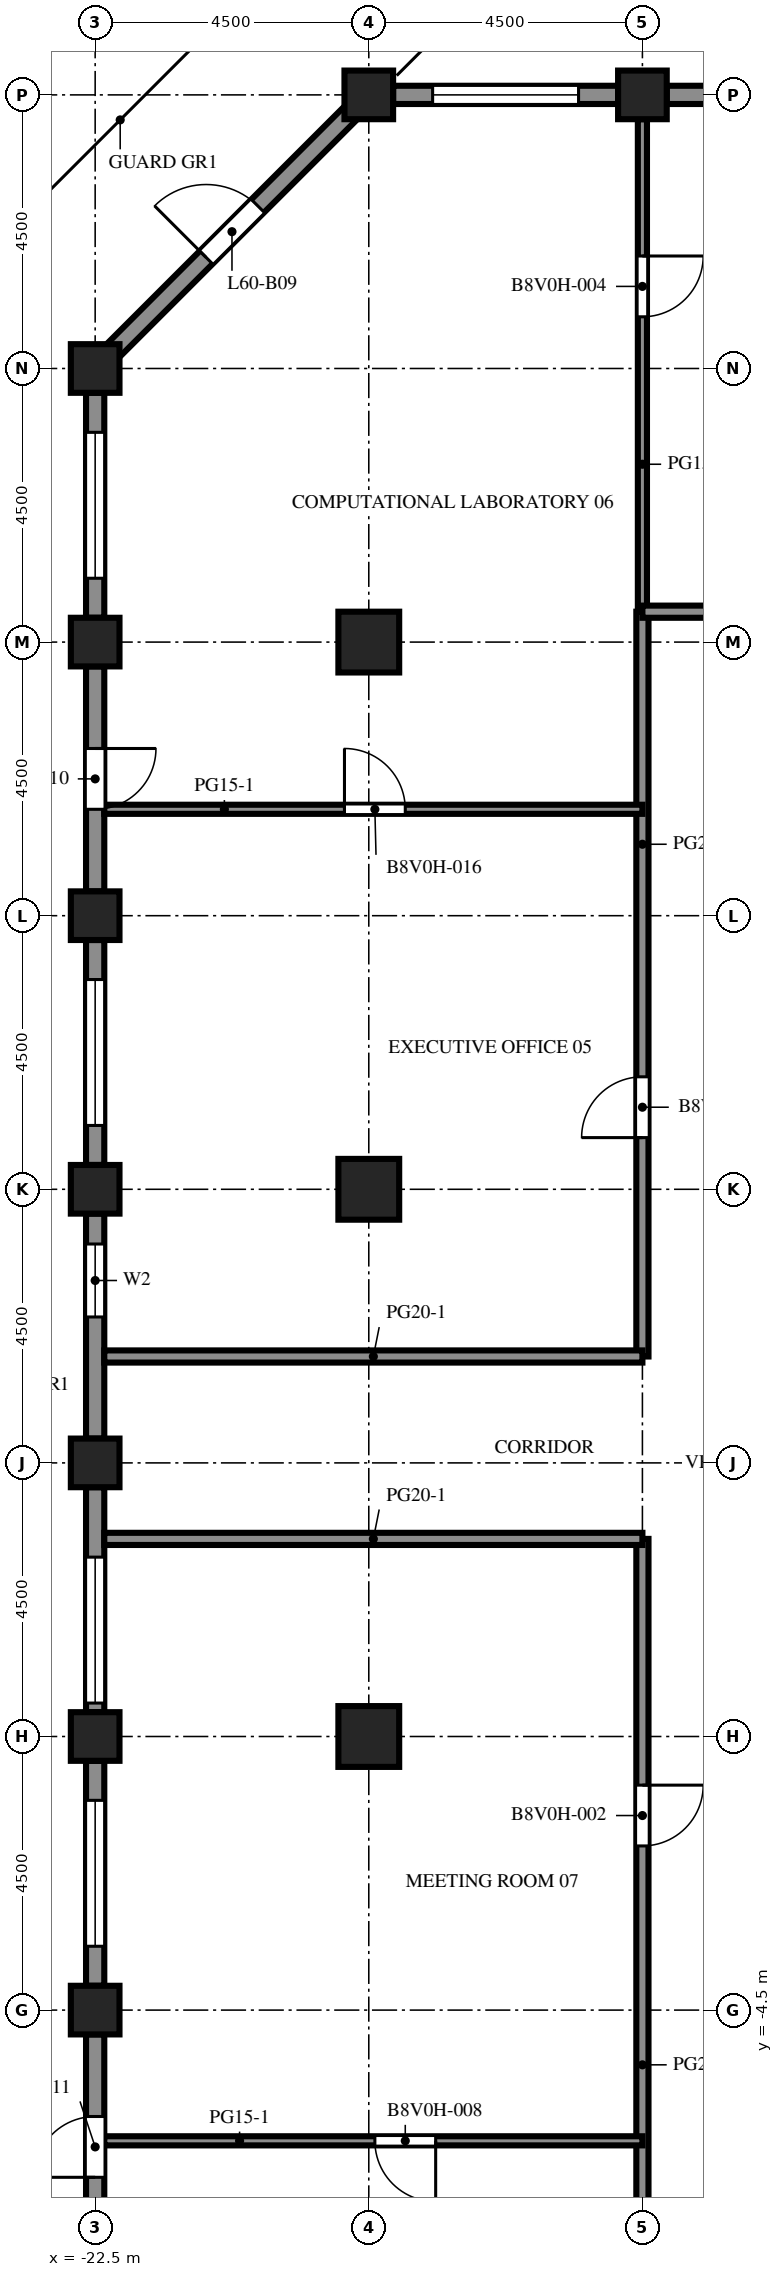
"""IFC4 building model, lengths in metres.
Left out: names, types, materials, properties, quantities, classifications, styles, units other than length and angle.
Written with IfcOpenShell. Run it as: python <this file> out.ifc"""

import sys

from ifc_helpers import new_model, si_unit, direction, frame, frame_2d, origin, origin_2d, place, context, subcontext, project, spatial, rectangle, extrude, element, fill, save


model = new_model("IFC4")
c1 = context("Model", 3, precision=1e-05, world=origin(), true_north=direction((0.0, 1.0)))
c2 = subcontext(c1, "Body", "Model", "MODEL_VIEW")
j1 = project(units=[si_unit("LENGTHUNIT", "METRE"), si_unit("PLANEANGLEUNIT", "RADIAN")], contexts=[c1])
p1 = place(None, origin())
s1 = spatial("IfcSite", under=j1, at=p1, CompositionType="ELEMENT")
p2 = place(p1, origin())
s2 = spatial("IfcBuilding", under=s1, at=p2, CompositionType="ELEMENT")
p3 = place(p2, frame((0.0, 0.0, 266.3)))
s3 = spatial("IfcBuildingStorey", under=s2, at=p3, CompositionType="ELEMENT", Elevation=266.3)
for number, where, z_axis, x_axis in (
    (1, (-22.5, -4.5, -0.45), (0.0, 0.0, 1.0), (1.0, 0.0, 0.0)),
    (2, (-22.5, 0.0, -0.45), (0.0, 0.0, 1.0), (1.0, 0.0, 0.0)),
    (3, (-22.5, 4.5, -0.45), (0.0, 0.0, 1.0), (1.0, 0.0, 0.0)),
    (4, (-22.5, 9.0, -0.45), (0.0, 0.0, 1.0), (1.0, 0.0, 0.0)),
    (5, (-22.5, 13.5, -0.45), (0.0, 0.0, 1.0), (1.0, 0.0, 0.0)),
    (6, (-22.5, 18.0, -0.45), (0.0, 0.0, 1.0), (1.0, 0.0, 0.0)),
    (7, (-22.5, 22.5, -0.45), (0.0, 0.0, 1.0), (1.0, 0.0, 0.0)),
    (8, (-18.0, 27.0, -0.45), (0.0, 0.0, 1.0), (1.0, 0.0, 0.0)),
    (9, (-13.5, 27.0, -0.45), (0.0, 0.0, 1.0), (1.0, 0.0, 0.0)),
):
    element("IfcColumn", number, at=place(p3, frame(where, z_axis=z_axis, x_axis=x_axis)), inside=s3, PredefinedType="COLUMN", context=c2, shape_type="SweptSolid", body=[
        extrude(rectangle(XDim=0.8, YDim=0.8, at=origin_2d()), origin(), (0.0, 0.0, 1.0), 4.55),
    ])
for number, where, z_axis, x_axis in (
    (10, (-18.0, 0.0, -0.45), (0.0, 0.0, 1.0), (1.0, 0.0, 0.0)),
    (11, (-18.0, 9.0, -0.45), (0.0, 0.0, 1.0), (1.0, 0.0, 0.0)),
    (12, (-18.0, 18.0, -0.45), (0.0, 0.0, 1.0), (1.0, 0.0, 0.0)),
):
    element("IfcColumn", number, at=place(p3, frame(where, z_axis=z_axis, x_axis=x_axis)), inside=s3, PredefinedType="COLUMN", context=c2, shape_type="SweptSolid", body=[
        extrude(rectangle(XDim=1.0, YDim=1.0, at=origin_2d()), origin(), (0.0, 0.0, 1.0), 4.55),
    ])
p4 = place(p3, frame((-13.1, 27.0, 0.0), z_axis=(0.0, 0.0, 1.0), x_axis=(1.0, 0.0, 0.0)))
e13 = element("IfcWall", 13, at=p4, inside=s3, PredefinedType="SOLIDWALL", context=c2, shape_type="SweptSolid", body=[
    extrude(rectangle(XDim=3.7, YDim=0.3, at=frame_2d((1.85, 0.0))), origin(), (0.0, 0.0, 1.0), 2.85),
])
p5 = place(p4, frame((1.35, 0.0, 0.0)))
e14 = element("IfcOpeningElement", 14, at=p5, cuts=e13, PredefinedType="OPENING", context=c2, shape_type="SweptSolid", body=[
    extrude(rectangle(XDim=1.0, YDim=2.2, at=frame_2d((0.5, 1.1))), frame((0.0, 0.16, 0.0), z_axis=(0.0, -1.0, 0.0), x_axis=(1.0, 0.0, 0.0)), (0.0, 0.0, 1.0), 0.32),
])
p6 = place(p3, frame((-17.6, 27.0, 0.0), z_axis=(0.0, 0.0, 1.0), x_axis=(1.0, 0.0, 0.0)))
e15 = element("IfcWall", 15, at=p6, inside=s3, PredefinedType="SOLIDWALL", context=c2, shape_type="SweptSolid", body=[
    extrude(rectangle(XDim=3.7, YDim=0.3, at=frame_2d((1.85, 0.0))), origin(), (0.0, 0.0, 1.0), 2.85),
])
p7 = place(p6, frame((0.65, 0.0, 0.8)))
e16 = element("IfcOpeningElement", 16, at=p7, cuts=e15, PredefinedType="OPENING", context=c2, shape_type="SweptSolid", body=[
    extrude(rectangle(XDim=2.4, YDim=1.7, at=frame_2d((1.2, 0.85))), frame((0.0, 0.16, 0.0), z_axis=(0.0, -1.0, 0.0), x_axis=(1.0, 0.0, 0.0)), (0.0, 0.0, 1.0), 0.32),
])
p8 = place(p3, frame((-22.206, 22.794, 0.0), z_axis=(0.0, 0.0, 1.0), x_axis=(0.707106781187, 0.707106781187, 0.0)))
e17 = element("IfcWall", 17, at=p8, inside=s3, PredefinedType="SOLIDWALL", context=c2, shape_type="SweptSolid", body=[
    extrude(rectangle(XDim=5.532, YDim=0.3, at=frame_2d((2.766, 0.0))), origin(), (0.0, 0.0, 1.0), 2.85),
])
p9 = place(p8, frame((2.166, 0.0, 0.0)))
e18 = element("IfcOpeningElement", 18, at=p9, cuts=e17, PredefinedType="OPENING", context=c2, shape_type="SweptSolid", body=[
    extrude(rectangle(XDim=1.2, YDim=2.2, at=frame_2d((0.6, 1.1))), frame((0.0, 0.16, 0.0), z_axis=(0.0, -1.0, 0.0), x_axis=(1.0, 0.0, 0.0)), (0.0, 0.0, 1.0), 0.32),
])
p10 = place(p3, frame((-22.5, 18.4, 0.0), z_axis=(0.0, 0.0, 1.0), x_axis=(0.0, 1.0, 0.0)))
e19 = element("IfcWall", 19, at=p10, inside=s3, PredefinedType="SOLIDWALL", context=c2, shape_type="SweptSolid", body=[
    extrude(rectangle(XDim=3.7, YDim=0.3, at=frame_2d((1.85, 0.0))), origin(), (0.0, 0.0, 1.0), 2.85),
])
p11 = place(p10, frame((0.65, 0.0, 0.8)))
e20 = element("IfcOpeningElement", 20, at=p11, cuts=e19, PredefinedType="OPENING", context=c2, shape_type="SweptSolid", body=[
    extrude(rectangle(XDim=2.4, YDim=1.7, at=frame_2d((1.2, 0.85))), frame((0.0, 0.16, 0.0), z_axis=(0.0, -1.0, 0.0), x_axis=(1.0, 0.0, 0.0)), (0.0, 0.0, 1.0), 0.32),
])
p12 = place(p3, frame((-22.5, 13.9, 0.0), z_axis=(0.0, 0.0, 1.0), x_axis=(0.0, 1.0, 0.0)))
e21 = element("IfcWall", 21, at=p12, inside=s3, PredefinedType="SOLIDWALL", context=c2, shape_type="SweptSolid", body=[
    extrude(rectangle(XDim=3.7, YDim=0.3, at=frame_2d((1.85, 0.0))), origin(), (0.0, 0.0, 1.0), 2.85),
])
p13 = place(p12, frame((1.35, 0.0, 0.0)))
e22 = element("IfcOpeningElement", 22, at=p13, cuts=e21, PredefinedType="OPENING", context=c2, shape_type="SweptSolid", body=[
    extrude(rectangle(XDim=1.0, YDim=2.2, at=frame_2d((0.5, 1.1))), frame((0.0, 0.16, 0.0), z_axis=(0.0, -1.0, 0.0), x_axis=(1.0, 0.0, 0.0)), (0.0, 0.0, 1.0), 0.32),
])
p14 = place(p3, frame((-22.5, 9.4, 0.0), z_axis=(0.0, 0.0, 1.0), x_axis=(0.0, 1.0, 0.0)))
e23 = element("IfcWall", 23, at=p14, inside=s3, PredefinedType="SOLIDWALL", context=c2, shape_type="SweptSolid", body=[
    extrude(rectangle(XDim=3.7, YDim=0.3, at=frame_2d((1.85, 0.0))), origin(), (0.0, 0.0, 1.0), 2.85),
])
p15 = place(p14, frame((0.65, 0.0, 0.8)))
e24 = element("IfcOpeningElement", 24, at=p15, cuts=e23, PredefinedType="OPENING", context=c2, shape_type="SweptSolid", body=[
    extrude(rectangle(XDim=2.4, YDim=1.7, at=frame_2d((1.2, 0.85))), frame((0.0, 0.16, 0.0), z_axis=(0.0, -1.0, 0.0), x_axis=(1.0, 0.0, 0.0)), (0.0, 0.0, 1.0), 0.32),
])
p16 = place(p3, frame((-22.5, 4.9, 0.0), z_axis=(0.0, 0.0, 1.0), x_axis=(0.0, 1.0, 0.0)))
e25 = element("IfcWall", 25, at=p16, inside=s3, PredefinedType="SOLIDWALL", context=c2, shape_type="SweptSolid", body=[
    extrude(rectangle(XDim=3.7, YDim=0.3, at=frame_2d((1.85, 0.0))), origin(), (0.0, 0.0, 1.0), 2.85),
])
p17 = place(p16, frame((2.0, 0.0, 0.8)))
e26 = element("IfcOpeningElement", 26, at=p17, cuts=e25, PredefinedType="OPENING", context=c2, shape_type="SweptSolid", body=[
    extrude(rectangle(XDim=1.2, YDim=1.7, at=frame_2d((0.6, 0.85))), frame((0.0, 0.16, 0.0), z_axis=(0.0, -1.0, 0.0), x_axis=(1.0, 0.0, 0.0)), (0.0, 0.0, 1.0), 0.32),
])
p18 = place(p3, frame((-22.5, 0.4, 0.0), z_axis=(0.0, 0.0, 1.0), x_axis=(0.0, 1.0, 0.0)))
e27 = element("IfcWall", 27, at=p18, inside=s3, PredefinedType="SOLIDWALL", context=c2, shape_type="SweptSolid", body=[
    extrude(rectangle(XDim=3.7, YDim=0.3, at=frame_2d((1.85, 0.0))), origin(), (0.0, 0.0, 1.0), 2.85),
])
p19 = place(p18, frame((0.15, 0.0, 0.8)))
e28 = element("IfcOpeningElement", 28, at=p19, cuts=e27, PredefinedType="OPENING", context=c2, shape_type="SweptSolid", body=[
    extrude(rectangle(XDim=2.4, YDim=1.7, at=frame_2d((1.2, 0.85))), frame((0.0, 0.16, 0.0), z_axis=(0.0, -1.0, 0.0), x_axis=(1.0, 0.0, 0.0)), (0.0, 0.0, 1.0), 0.32),
])
p20 = place(p3, frame((-22.5, -4.1, 0.0), z_axis=(0.0, 0.0, 1.0), x_axis=(0.0, 1.0, 0.0)))
e29 = element("IfcWall", 29, at=p20, inside=s3, PredefinedType="SOLIDWALL", context=c2, shape_type="SweptSolid", body=[
    extrude(rectangle(XDim=3.7, YDim=0.3, at=frame_2d((1.85, 0.0))), origin(), (0.0, 0.0, 1.0), 2.85),
])
p21 = place(p20, frame((0.65, 0.0, 0.8)))
e30 = element("IfcOpeningElement", 30, at=p21, cuts=e29, PredefinedType="OPENING", context=c2, shape_type="SweptSolid", body=[
    extrude(rectangle(XDim=2.4, YDim=1.7, at=frame_2d((1.2, 0.85))), frame((0.0, 0.16, 0.0), z_axis=(0.0, -1.0, 0.0), x_axis=(1.0, 0.0, 0.0)), (0.0, 0.0, 1.0), 0.32),
])
p22 = place(p3, frame((-22.5, -8.6, 0.0), z_axis=(0.0, 0.0, 1.0), x_axis=(0.0, 1.0, 0.0)))
e31 = element("IfcWall", 31, at=p22, inside=s3, PredefinedType="SOLIDWALL", context=c2, shape_type="SweptSolid", body=[
    extrude(rectangle(XDim=3.7, YDim=0.3, at=frame_2d((1.85, 0.0))), origin(), (0.0, 0.0, 1.0), 2.85),
])
p23 = place(p22, frame((1.35, 0.0, 0.0)))
e32 = element("IfcOpeningElement", 32, at=p23, cuts=e31, PredefinedType="OPENING", context=c2, shape_type="SweptSolid", body=[
    extrude(rectangle(XDim=1.0, YDim=2.2, at=frame_2d((0.5, 1.1))), frame((0.0, 0.16, 0.0), z_axis=(0.0, -1.0, 0.0), x_axis=(1.0, 0.0, 0.0)), (0.0, 0.0, 1.0), 0.32),
])
p24 = place(p3, frame((-13.5, 26.6, 0.0), z_axis=(0.0, 0.0, 1.0), x_axis=(0.0, -1.0, 0.0)))
e33 = element("IfcWall", 33, at=p24, inside=s3, PredefinedType="PARTITIONING", context=c2, shape_type="SweptSolid", body=[
    extrude(rectangle(XDim=8.1, YDim=0.15, at=frame_2d((4.05, 0.0))), origin(), (0.0, 0.0, 1.0), 3.65),
])
p25 = place(p24, frame((2.25, 0.0, 0.0)))
e34 = element("IfcOpeningElement", 34, at=p25, cuts=e33, PredefinedType="OPENING", context=c2, shape_type="SweptSolid", body=[
    extrude(rectangle(XDim=1.0, YDim=2.1, at=frame_2d((0.5, 1.05))), frame((0.0, 0.085, 0.0), z_axis=(0.0, -1.0, 0.0), x_axis=(1.0, 0.0, 0.0)), (0.0, 0.0, 1.0), 0.17),
])
p26 = place(p3, frame((-13.5, -9.0, 0.0), z_axis=(0.0, 0.0, 1.0), x_axis=(0.0, 1.0, 0.0)))
e35 = element("IfcWall", 35, at=p26, inside=s3, PredefinedType="PARTITIONING", context=c2, shape_type="SweptSolid", body=[
    extrude(rectangle(XDim=12.25, YDim=0.2, at=frame_2d((6.125, 0.0))), origin(), (0.0, 0.0, 1.0), 3.65),
])
p27 = place(p26, frame((7.2, 0.0, 0.0)))
e36 = element("IfcOpeningElement", 36, at=p27, cuts=e35, PredefinedType="OPENING", context=c2, shape_type="SweptSolid", body=[
    extrude(rectangle(XDim=1.0, YDim=2.1, at=frame_2d((0.5, 1.05))), frame((0.0, 0.11, 0.0), z_axis=(0.0, -1.0, 0.0), x_axis=(1.0, 0.0, 0.0)), (0.0, 0.0, 1.0), 0.22),
])
p28 = place(p3, frame((-13.5, 6.25, 0.0), z_axis=(0.0, 0.0, 1.0), x_axis=(0.0, 1.0, 0.0)))
e37 = element("IfcWall", 37, at=p28, inside=s3, PredefinedType="PARTITIONING", context=c2, shape_type="SweptSolid", body=[
    extrude(rectangle(XDim=12.25, YDim=0.2, at=frame_2d((6.125, 0.0))), origin(), (0.0, 0.0, 1.0), 3.65),
])
p29 = place(p28, frame((3.6, 0.0, 0.0)))
e38 = element("IfcOpeningElement", 38, at=p29, cuts=e37, PredefinedType="OPENING", context=c2, shape_type="SweptSolid", body=[
    extrude(rectangle(XDim=1.0, YDim=2.1, at=frame_2d((0.5, 1.05))), frame((0.0, 0.11, 0.0), z_axis=(0.0, -1.0, 0.0), x_axis=(1.0, 0.0, 0.0)), (0.0, 0.0, 1.0), 0.22),
])
p30 = place(p3, frame((-13.5, -6.65, 0.0), z_axis=(0.0, 0.0, 1.0), x_axis=(-1.0, 0.0, 0.0)))
e39 = element("IfcWall", 39, at=p30, inside=s3, PredefinedType="PARTITIONING", context=c2, shape_type="SweptSolid", body=[
    extrude(rectangle(XDim=8.85, YDim=0.15, at=frame_2d((4.425, 0.0))), origin(), (0.0, 0.0, 1.0), 3.65),
])
p31 = place(p30, frame((3.4, 0.0, 0.0)))
e40 = element("IfcOpeningElement", 40, at=p31, cuts=e39, PredefinedType="OPENING", context=c2, shape_type="SweptSolid", body=[
    extrude(rectangle(XDim=1.0, YDim=2.1, at=frame_2d((0.5, 1.05))), frame((0.0, 0.085, 0.0), z_axis=(0.0, -1.0, 0.0), x_axis=(1.0, 0.0, 0.0)), (0.0, 0.0, 1.0), 0.17),
])
for number, where, z_axis, x_axis in (
    (41, (-22.35, 3.25, 0.0), (0.0, 0.0, 1.0), (1.0, 0.0, 0.0)),
    (42, (-22.35, 6.25, 0.0), (0.0, 0.0, 1.0), (1.0, 0.0, 0.0)),
):
    element("IfcWall", number, at=place(p3, frame(where, z_axis=z_axis, x_axis=x_axis)), inside=s3, PredefinedType="PARTITIONING", context=c2, shape_type="SweptSolid", body=[
        extrude(rectangle(XDim=8.85, YDim=0.2, at=frame_2d((4.425, 0.0))), origin(), (0.0, 0.0, 1.0), 3.65),
    ])
p32 = place(p3, frame((-22.35, 15.25, 0.0), z_axis=(0.0, 0.0, 1.0), x_axis=(1.0, 0.0, 0.0)))
e43 = element("IfcWall", 43, at=p32, inside=s3, PredefinedType="PARTITIONING", context=c2, shape_type="SweptSolid", body=[
    extrude(rectangle(XDim=8.85, YDim=0.15, at=frame_2d((4.425, 0.0))), origin(), (0.0, 0.0, 1.0), 3.65),
])
p33 = place(p32, frame((3.95, 0.0, 0.0)))
e44 = element("IfcOpeningElement", 44, at=p33, cuts=e43, PredefinedType="OPENING", context=c2, shape_type="SweptSolid", body=[
    extrude(rectangle(XDim=1.0, YDim=2.1, at=frame_2d((0.5, 1.05))), frame((0.0, 0.085, 0.0), z_axis=(0.0, -1.0, 0.0), x_axis=(1.0, 0.0, 0.0)), (0.0, 0.0, 1.0), 0.17),
])
p34 = place(p3, frame((-13.5, 18.5, 0.0), z_axis=(0.0, 0.0, 1.0), x_axis=(1.0, 0.0, 0.0)))
e45 = element("IfcWall", 45, at=p34, inside=s3, PredefinedType="PARTITIONING", context=c2, shape_type="SweptSolid", body=[
    extrude(rectangle(XDim=3.0, YDim=0.2, at=frame_2d((1.5, 0.0))), origin(), (0.0, 0.0, 1.0), 3.65),
])
p35 = place(p7, origin())
e46 = element("IfcWindow", 46, at=p35, inside=s3, PartitioningType="SINGLE_PANEL", PredefinedType="WINDOW", context=c2, shape_type="SweptSolid", body=[
    extrude(rectangle(XDim=2.4, YDim=1.7, at=frame_2d((1.2, 0.85))), frame((0.0, 0.03, 0.0), z_axis=(0.0, -1.0, 0.0), x_axis=(1.0, 0.0, 0.0)), (0.0, 0.0, 1.0), 0.06),
])
fill(e16, e46)
p36 = place(p9, origin())
e47 = element("IfcDoor", 47, at=p36, inside=s3, OperationType="SINGLE_SWING_LEFT", PredefinedType="DOOR", context=c2, shape_type="SweptSolid", body=[
    extrude(rectangle(XDim=1.2, YDim=2.2, at=frame_2d((0.6, 1.1))), frame((0.0, 0.025, 0.0), z_axis=(0.0, -1.0, 0.0), x_axis=(1.0, 0.0, 0.0)), (0.0, 0.0, 1.0), 0.05),
])
fill(e18, e47)
p37 = place(p11, origin())
e48 = element("IfcWindow", 48, at=p37, inside=s3, PartitioningType="SINGLE_PANEL", PredefinedType="WINDOW", context=c2, shape_type="SweptSolid", body=[
    extrude(rectangle(XDim=2.4, YDim=1.7, at=frame_2d((1.2, 0.85))), frame((0.0, 0.03, 0.0), z_axis=(0.0, -1.0, 0.0), x_axis=(1.0, 0.0, 0.0)), (0.0, 0.0, 1.0), 0.06),
])
fill(e20, e48)
p38 = place(p13, origin())
e49 = element("IfcDoor", 49, at=p38, inside=s3, OperationType="SINGLE_SWING_RIGHT", PredefinedType="DOOR", context=c2, shape_type="SweptSolid", body=[
    extrude(rectangle(XDim=1.0, YDim=2.2, at=frame_2d((0.5, 1.1))), frame((0.0, 0.025, 0.0), z_axis=(0.0, -1.0, 0.0), x_axis=(1.0, 0.0, 0.0)), (0.0, 0.0, 1.0), 0.05),
])
fill(e22, e49)
p39 = place(p15, origin())
e50 = element("IfcWindow", 50, at=p39, inside=s3, PartitioningType="SINGLE_PANEL", PredefinedType="WINDOW", context=c2, shape_type="SweptSolid", body=[
    extrude(rectangle(XDim=2.4, YDim=1.7, at=frame_2d((1.2, 0.85))), frame((0.0, 0.03, 0.0), z_axis=(0.0, -1.0, 0.0), x_axis=(1.0, 0.0, 0.0)), (0.0, 0.0, 1.0), 0.06),
])
fill(e24, e50)
p40 = place(p17, origin())
e51 = element("IfcWindow", 51, at=p40, inside=s3, PartitioningType="SINGLE_PANEL", PredefinedType="WINDOW", context=c2, shape_type="SweptSolid", body=[
    extrude(rectangle(XDim=1.2, YDim=1.7, at=frame_2d((0.6, 0.85))), frame((0.0, 0.03, 0.0), z_axis=(0.0, -1.0, 0.0), x_axis=(1.0, 0.0, 0.0)), (0.0, 0.0, 1.0), 0.06),
])
fill(e26, e51)
p41 = place(p19, origin())
e52 = element("IfcWindow", 52, at=p41, inside=s3, PartitioningType="SINGLE_PANEL", PredefinedType="WINDOW", context=c2, shape_type="SweptSolid", body=[
    extrude(rectangle(XDim=2.4, YDim=1.7, at=frame_2d((1.2, 0.85))), frame((0.0, 0.03, 0.0), z_axis=(0.0, -1.0, 0.0), x_axis=(1.0, 0.0, 0.0)), (0.0, 0.0, 1.0), 0.06),
])
fill(e28, e52)
p42 = place(p21, origin())
e53 = element("IfcWindow", 53, at=p42, inside=s3, PartitioningType="SINGLE_PANEL", PredefinedType="WINDOW", context=c2, shape_type="SweptSolid", body=[
    extrude(rectangle(XDim=2.4, YDim=1.7, at=frame_2d((1.2, 0.85))), frame((0.0, 0.03, 0.0), z_axis=(0.0, -1.0, 0.0), x_axis=(1.0, 0.0, 0.0)), (0.0, 0.0, 1.0), 0.06),
])
fill(e30, e53)
p43 = place(p23, origin())
e54 = element("IfcDoor", 54, at=p43, inside=s3, OperationType="SINGLE_SWING_LEFT", PredefinedType="DOOR", context=c2, shape_type="SweptSolid", body=[
    extrude(rectangle(XDim=1.0, YDim=2.2, at=frame_2d((0.5, 1.1))), frame((0.0, 0.025, 0.0), z_axis=(0.0, -1.0, 0.0), x_axis=(1.0, 0.0, 0.0)), (0.0, 0.0, 1.0), 0.05),
])
fill(e32, e54)
p44 = place(p27, origin())
e55 = element("IfcDoor", 55, at=p44, inside=s3, OperationType="SINGLE_SWING_RIGHT", PredefinedType="DOOR", context=c2, shape_type="SweptSolid", body=[
    extrude(rectangle(XDim=1.0, YDim=2.1, at=frame_2d((0.5, 1.05))), frame((0.0, 0.025, 0.0), z_axis=(0.0, -1.0, 0.0), x_axis=(1.0, 0.0, 0.0)), (0.0, 0.0, 1.0), 0.05),
])
fill(e36, e55)
p45 = place(p29, origin())
e56 = element("IfcDoor", 56, at=p45, inside=s3, OperationType="SINGLE_SWING_LEFT", PredefinedType="DOOR", context=c2, shape_type="SweptSolid", body=[
    extrude(rectangle(XDim=1.0, YDim=2.1, at=frame_2d((0.5, 1.05))), frame((0.0, 0.025, 0.0), z_axis=(0.0, -1.0, 0.0), x_axis=(1.0, 0.0, 0.0)), (0.0, 0.0, 1.0), 0.05),
])
fill(e38, e56)
p46 = place(p25, origin())
e57 = element("IfcDoor", 57, at=p46, inside=s3, OperationType="SINGLE_SWING_LEFT", PredefinedType="DOOR", context=c2, shape_type="SweptSolid", body=[
    extrude(rectangle(XDim=1.0, YDim=2.1, at=frame_2d((0.5, 1.05))), frame((0.0, 0.025, 0.0), z_axis=(0.0, -1.0, 0.0), x_axis=(1.0, 0.0, 0.0)), (0.0, 0.0, 1.0), 0.05),
])
fill(e34, e57)
p47 = place(p31, origin())
e58 = element("IfcDoor", 58, at=p47, inside=s3, OperationType="SINGLE_SWING_LEFT", PredefinedType="DOOR", context=c2, shape_type="SweptSolid", body=[
    extrude(rectangle(XDim=1.0, YDim=2.1, at=frame_2d((0.5, 1.05))), frame((0.0, 0.025, 0.0), z_axis=(0.0, -1.0, 0.0), x_axis=(1.0, 0.0, 0.0)), (0.0, 0.0, 1.0), 0.05),
])
fill(e40, e58)
p48 = place(p33, origin())
e59 = element("IfcDoor", 59, at=p48, inside=s3, OperationType="SINGLE_SWING_LEFT", PredefinedType="DOOR", context=c2, shape_type="SweptSolid", body=[
    extrude(rectangle(XDim=1.0, YDim=2.1, at=frame_2d((0.5, 1.05))), frame((0.0, 0.025, 0.0), z_axis=(0.0, -1.0, 0.0), x_axis=(1.0, 0.0, 0.0)), (0.0, 0.0, 1.0), 0.05),
])
fill(e44, e59)
save(model, sys.argv[1])
